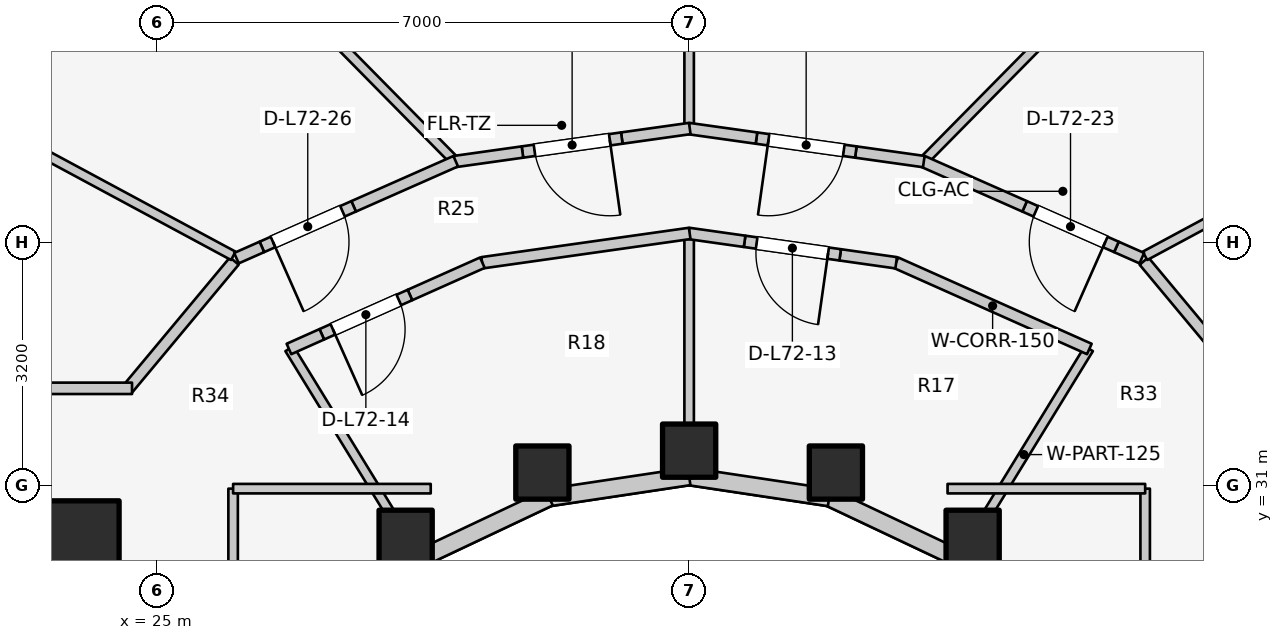
"""IFC4 building model, lengths in metres.
Left out: names, types, materials, properties, quantities, classifications, styles, units other than length and angle.
Written with IfcOpenShell. Run it as: python <this file> out.ifc"""

import sys

from ifc_helpers import new_model, si_unit, direction, frame, frame_2d, origin, origin_2d, place, context, subcontext, project, spatial, rectangle, extrude, element, fill, save


model = new_model("IFC4")
c1 = context("Model", 3, precision=1e-05, world=origin(), true_north=direction((0.0, 1.0)))
c2 = subcontext(c1, "Body", "Model", "MODEL_VIEW")
j1 = project(units=[si_unit("LENGTHUNIT", "METRE"), si_unit("PLANEANGLEUNIT", "RADIAN")], contexts=[c1])
p1 = place(None, origin())
s1 = spatial("IfcSite", under=j1, at=p1, CompositionType="ELEMENT")
p2 = place(p1, origin())
s2 = spatial("IfcBuilding", under=s1, at=p2, CompositionType="ELEMENT")
p3 = place(p2, frame((0.0, 0.0, 235.7)))
s3 = spatial("IfcBuildingStorey", under=s2, at=p3, CompositionType="ELEMENT", Elevation=235.7)
p4 = place(p3, frame((19.65, 30.35, 0.0), z_axis=(0.0, 0.0, 1.0), x_axis=(1.0, 0.0, 0.0)))
e1 = element("IfcWall", 1, at=p4, inside=s3, PredefinedType="SHEAR", context=c2, shape_type="SweptSolid", body=[
    extrude(rectangle(XDim=4.5, YDim=0.55, at=frame_2d((2.25, 0.0))), origin(), (0.0, 0.0, 1.0), 3.1),
])
p5 = place(p3, frame((23.9, 30.2, 0.0), z_axis=(0.0, 0.0, 1.0), x_axis=(1.0, 0.0, 0.0)))
e2 = element("IfcColumn", 2, at=p5, inside=s3, PredefinedType="COLUMN", context=c2, shape_type="SweptSolid", body=[
    extrude(rectangle(XDim=1.2, YDim=1.2, at=origin_2d()), origin(), (0.0, 0.0, 1.0), 3.1),
])
for number, where, z_axis, x_axis in (
    (3, (35.73, 30.327, 0.0), (0.0, 0.0, 1.0), (1.0, 0.0, 0.0)),
    (4, (33.931, 31.172, 0.0), (0.0, 0.0, 1.0), (1.0, 0.0, 0.0)),
    (5, (32.0, 31.46, 0.0), (0.0, 0.0, 1.0), (1.0, 0.0, 0.0)),
    (6, (30.069, 31.172, 0.0), (0.0, 0.0, 1.0), (1.0, 0.0, 0.0)),
    (7, (28.27, 30.327, 0.0), (0.0, 0.0, 1.0), (1.0, 0.0, 0.0)),
):
    element("IfcColumn", number, at=place(p3, frame(where, z_axis=z_axis, x_axis=x_axis)), inside=s3, PredefinedType="COLUMN", context=c2, shape_type="SweptSolid", body=[
        extrude(rectangle(XDim=0.7, YDim=0.7, at=origin_2d()), origin(), (0.0, 0.0, 1.0), 3.1),
    ])
p6 = place(p3, frame((37.035, 28.742, 0.0), z_axis=(0.0, 0.0, 1.0), x_axis=(-0.752576694707, 0.658504607869, 0.0)))
e8 = element("IfcWall", 8, at=p6, inside=s3, PredefinedType="STANDARD", context=c2, shape_type="SweptSolid", body=[
    extrude(rectangle(XDim=1.959, YDim=0.23, at=frame_2d((0.98, 0.0))), origin(), (0.0, 0.0, 1.0), 1.22),
])
p7 = place(p3, frame((35.56, 30.032, 0.0), z_axis=(0.0, 0.0, 1.0), x_axis=(-0.904179699603, 0.427152280606, 0.0)))
e9 = element("IfcWall", 9, at=p7, inside=s3, PredefinedType="STANDARD", context=c2, shape_type="SweptSolid", body=[
    extrude(rectangle(XDim=1.899, YDim=0.23, at=frame_2d((0.95, 0.0))), origin(), (0.0, 0.0, 1.0), 1.22),
])
for number, where, z_axis, x_axis in (
    (10, (33.843, 30.843, 0.0), (0.0, 0.0, 1.0), (-0.989, 0.149, 0.0)),
    (11, (32.0, 31.12, 0.0), (0.0, 0.0, 1.0), (-0.989, -0.149, 0.0)),
):
    element("IfcWall", number, at=place(p3, frame(where, z_axis=z_axis, x_axis=x_axis)), inside=s3, PredefinedType="STANDARD", context=c2, shape_type="SweptSolid", body=[
        extrude(rectangle(XDim=1.864, YDim=0.23, at=frame_2d((0.932, 0.0))), origin(), (0.0, 0.0, 1.0), 1.22),
    ])
p8 = place(p3, frame((30.157, 30.843, 0.0), z_axis=(0.0, 0.0, 1.0), x_axis=(-0.904179699603, -0.427152280606, 0.0)))
e12 = element("IfcWall", 12, at=p8, inside=s3, PredefinedType="STANDARD", context=c2, shape_type="SweptSolid", body=[
    extrude(rectangle(XDim=1.899, YDim=0.23, at=frame_2d((0.95, 0.0))), origin(), (0.0, 0.0, 1.0), 1.22),
])
p9 = place(p3, frame((28.44, 30.032, 0.0), z_axis=(0.0, 0.0, 1.0), x_axis=(-0.752576694707, -0.658504607869, 0.0)))
e13 = element("IfcWall", 13, at=p9, inside=s3, PredefinedType="STANDARD", context=c2, shape_type="SweptSolid", body=[
    extrude(rectangle(XDim=1.959, YDim=0.23, at=frame_2d((0.98, 0.0))), origin(), (0.0, 0.0, 1.0), 1.22),
])
p10 = place(p3, frame((35.55, 30.015, 0.0), z_axis=(0.0, 0.0, 1.0), x_axis=(0.522763432117, 0.852477796802, 0.0)))
e14 = element("IfcWall", 14, at=p10, inside=s3, PredefinedType="PARTITIONING", context=c2, shape_type="SweptSolid", body=[
    extrude(rectangle(XDim=3.269, YDim=0.125, at=frame_2d((1.635, 0.0))), origin(), (0.0, 0.0, 1.0), 1.22),
])
p11 = place(p3, frame((32.0, 31.1, 0.0), z_axis=(0.0, 0.0, 1.0), x_axis=(0.0, 1.0, 0.0)))
e15 = element("IfcWall", 15, at=p11, inside=s3, PredefinedType="PARTITIONING", context=c2, shape_type="SweptSolid", body=[
    extrude(rectangle(XDim=3.218, YDim=0.125, at=frame_2d((1.609, 0.0))), origin(), (0.0, 0.0, 1.0), 1.22),
])
p12 = place(p3, frame((28.45, 30.015, 0.0), z_axis=(0.0, 0.0, 1.0), x_axis=(-0.522763432117, 0.852477796802, 0.0)))
e16 = element("IfcWall", 16, at=p12, inside=s3, PredefinedType="PARTITIONING", context=c2, shape_type="SweptSolid", body=[
    extrude(rectangle(XDim=3.269, YDim=0.125, at=frame_2d((1.635, 0.0))), origin(), (0.0, 0.0, 1.0), 1.22),
])
p13 = place(p3, frame((37.265, 32.798, 0.0), z_axis=(0.0, 0.0, 1.0), x_axis=(-0.913254317828, 0.407389924971, 0.0)))
e17 = element("IfcWall", 17, at=p13, inside=s3, PredefinedType="PARTITIONING", context=c2, shape_type="SweptSolid", body=[
    extrude(rectangle(XDim=2.787, YDim=0.15, at=frame_2d((1.393, 0.0))), origin(), (0.0, 0.0, 1.0), 1.22),
])
p14 = place(p3, frame((34.724, 33.932, 0.0), z_axis=(0.0, 0.0, 1.0), x_axis=(-0.990190745647, 0.13972217875, 0.0)))
e18 = element("IfcWall", 18, at=p14, inside=s3, PredefinedType="PARTITIONING", context=c2, shape_type="SweptSolid", body=[
    extrude(rectangle(XDim=0.744, YDim=0.15, at=frame_2d((0.372, 0.0))), origin(), (0.0, 0.0, 1.0), 2.575),
])
p15 = place(p3, frame((33.987, 34.036, 0.0), z_axis=(0.0, 0.0, 1.0), x_axis=(-0.990133183593, 0.140129507055, 0.0)))
e19 = element("IfcWall", 19, at=p15, inside=s3, PredefinedType="PARTITIONING", context=c2, shape_type="SweptSolid", body=[
    extrude(rectangle(XDim=1.27, YDim=0.15, at=frame_2d((0.635, 0.0))), origin(), (0.0, 0.0, 1.0), 2.575),
])
p16 = place(p15, frame((0.16, 0.0, 0.0)))
e20 = element("IfcOpeningElement", 20, at=p16, cuts=e19, PredefinedType="OPENING", context=c2, shape_type="SweptSolid", body=[
    extrude(rectangle(XDim=0.95, YDim=2.1, at=frame_2d((0.475, 1.05))), frame((0.0, 0.085, 0.0), z_axis=(0.0, -1.0, 0.0), x_axis=(1.0, 0.0, 0.0)), (0.0, 0.0, 1.0), 0.17),
])
p17 = place(p3, frame((32.729, 34.214, 0.0), z_axis=(0.0, 0.0, 1.0), x_axis=(-0.990138882688, 0.140089232242, 0.0)))
e21 = element("IfcWall", 21, at=p17, inside=s3, PredefinedType="PARTITIONING", context=c2, shape_type="SweptSolid", body=[
    extrude(rectangle(XDim=0.744, YDim=0.15, at=frame_2d((0.372, 0.0))), origin(), (0.0, 0.0, 1.0), 1.22),
])
p18 = place(p3, frame((32.007, 34.318, 0.0), z_axis=(0.0, 0.0, 1.0), x_axis=(-0.990150268487, -0.140008734782, 0.0)))
e22 = element("IfcWall", 22, at=p18, inside=s3, PredefinedType="PARTITIONING", context=c2, shape_type="SweptSolid", body=[
    extrude(rectangle(XDim=2.759, YDim=0.15, at=frame_2d((1.379, 0.0))), origin(), (0.0, 0.0, 1.0), 1.22),
])
p19 = place(p3, frame((29.28, 33.933, 0.0), z_axis=(0.0, 0.0, 1.0), x_axis=(-0.913260714955, -0.407375584099, 0.0)))
e23 = element("IfcWall", 23, at=p19, inside=s3, PredefinedType="PARTITIONING", context=c2, shape_type="SweptSolid", body=[
    extrude(rectangle(XDim=1.043, YDim=0.15, at=frame_2d((0.522, 0.0))), origin(), (0.0, 0.0, 1.0), 1.22),
])
p20 = place(p3, frame((28.327, 33.508, 0.0), z_axis=(0.0, 0.0, 1.0), x_axis=(-0.913279660534, -0.40733310896, 0.0)))
e24 = element("IfcWall", 24, at=p20, inside=s3, PredefinedType="PARTITIONING", context=c2, shape_type="SweptSolid", body=[
    extrude(rectangle(XDim=1.27, YDim=0.15, at=frame_2d((0.635, 0.0))), origin(), (0.0, 0.0, 1.0), 2.16),
])
p21 = place(p20, frame((0.16, 0.0, 0.0)))
e25 = element("IfcOpeningElement", 25, at=p21, cuts=e24, PredefinedType="OPENING", context=c2, shape_type="SweptSolid", body=[
    extrude(rectangle(XDim=0.95, YDim=2.1, at=frame_2d((0.475, 1.05))), frame((0.0, 0.085, 0.0), z_axis=(0.0, -1.0, 0.0), x_axis=(1.0, 0.0, 0.0)), (0.0, 0.0, 1.0), 0.17),
])
p22 = place(p3, frame((27.167, 32.99, 0.0), z_axis=(0.0, 0.0, 1.0), x_axis=(-0.913172173043, -0.407574020737, 0.0)))
e26 = element("IfcWall", 26, at=p22, inside=s3, PredefinedType="PARTITIONING", context=c2, shape_type="SweptSolid", body=[
    extrude(rectangle(XDim=0.473, YDim=0.15, at=frame_2d((0.237, 0.0))), origin(), (0.0, 0.0, 1.0), 2.575),
])
p23 = place(p3, frame((26.0, 25.8, 0.0), z_axis=(0.0, 0.0, 1.0), x_axis=(0.0, 1.0, 0.0)))
e27 = element("IfcWall", 27, at=p23, inside=s3, PredefinedType="PARTITIONING", context=c2, shape_type="SweptSolid", body=[
    extrude(rectangle(XDim=5.16, YDim=0.125, at=frame_2d((2.58, 0.0))), origin(), (0.0, 0.0, 1.0), 1.952),
])
p24 = place(p3, frame((26.0, 30.96, 0.0), z_axis=(0.0, 0.0, 1.0), x_axis=(1.0, 0.0, 0.0)))
e28 = element("IfcWall", 28, at=p24, inside=s3, PredefinedType="PARTITIONING", context=c2, shape_type="SweptSolid", body=[
    extrude(rectangle(XDim=2.6, YDim=0.125, at=frame_2d((1.3, 0.0))), origin(), (0.0, 0.0, 1.0), 1.22),
])
p25 = place(p3, frame((38.0, 25.8, 0.0), z_axis=(0.0, 0.0, 1.0), x_axis=(0.0, 1.0, 0.0)))
e29 = element("IfcWall", 29, at=p25, inside=s3, PredefinedType="PARTITIONING", context=c2, shape_type="SweptSolid", body=[
    extrude(rectangle(XDim=5.16, YDim=0.125, at=frame_2d((2.58, 0.0))), origin(), (0.0, 0.0, 1.0), 1.952),
])
p26 = place(p3, frame((35.4, 30.96, 0.0), z_axis=(0.0, 0.0, 1.0), x_axis=(1.0, 0.0, 0.0)))
e30 = element("IfcWall", 30, at=p26, inside=s3, PredefinedType="PARTITIONING", context=c2, shape_type="SweptSolid", body=[
    extrude(rectangle(XDim=2.6, YDim=0.125, at=frame_2d((1.3, 0.0))), origin(), (0.0, 0.0, 1.0), 1.22),
])
for number, where, z_axis, x_axis in (
    (31, (37.984, 33.955, 0.0), (0.0, 0.0, 1.0), (0.64, -0.768, 0.0)),
    (32, (26.016, 33.955, 0.0), (0.0, 0.0, 1.0), (-0.64, -0.768, 0.0)),
):
    element("IfcWall", number, at=place(p3, frame(where, z_axis=z_axis, x_axis=x_axis)), inside=s3, PredefinedType="PARTITIONING", context=c2, shape_type="SweptSolid", body=[
        extrude(rectangle(XDim=2.21, YDim=0.15, at=frame_2d((1.105, 0.0))), origin(), (0.0, 0.0, 1.0), 1.22),
    ])
p27 = place(p3, frame((19.51, 32.28, 0.0), z_axis=(0.0, 0.0, 1.0), x_axis=(1.0, 0.0, 0.0)))
e33 = element("IfcWall", 33, at=p27, inside=s3, PredefinedType="PARTITIONING", context=c2, shape_type="SweptSolid", body=[
    extrude(rectangle(XDim=5.16, YDim=0.15, at=frame_2d((2.58, 0.0))), origin(), (0.0, 0.0, 1.0), 1.22),
])
p28 = place(p3, frame((37.997, 34.023, 0.0), z_axis=(0.0, 0.0, 1.0), x_axis=(0.880531534665, 0.473987569943, 0.0)))
e34 = element("IfcWall", 34, at=p28, inside=s3, PredefinedType="PARTITIONING", context=c2, shape_type="SweptSolid", body=[
    extrude(rectangle(XDim=6.096, YDim=0.125, at=frame_2d((3.048, 0.0))), origin(), (0.0, 0.0, 1.0), 1.22),
])
p29 = place(p3, frame((35.118, 35.304, 0.0), z_axis=(0.0, 0.0, 1.0), x_axis=(0.702191571271, 0.711988059756, 0.0)))
e35 = element("IfcWall", 35, at=p29, inside=s3, PredefinedType="PARTITIONING", context=c2, shape_type="SweptSolid", body=[
    extrude(rectangle(XDim=5.184, YDim=0.125, at=frame_2d((2.592, 0.0))), origin(), (0.0, 0.0, 1.0), 1.22),
])
p30 = place(p3, frame((32.0, 35.753, 0.0), z_axis=(0.0, 0.0, 1.0), x_axis=(0.0, 1.0, 0.0)))
e36 = element("IfcWall", 36, at=p30, inside=s3, PredefinedType="PARTITIONING", context=c2, shape_type="SweptSolid", body=[
    extrude(rectangle(XDim=3.947, YDim=0.125, at=frame_2d((1.974, 0.0))), origin(), (0.0, 0.0, 1.0), 1.22),
])
p31 = place(p3, frame((28.882, 35.304, 0.0), z_axis=(0.0, 0.0, 1.0), x_axis=(-0.702191571271, 0.711988059756, 0.0)))
e37 = element("IfcWall", 37, at=p31, inside=s3, PredefinedType="PARTITIONING", context=c2, shape_type="SweptSolid", body=[
    extrude(rectangle(XDim=5.184, YDim=0.125, at=frame_2d((2.592, 0.0))), origin(), (0.0, 0.0, 1.0), 1.22),
])
p32 = place(p3, frame((26.003, 34.023, 0.0), z_axis=(0.0, 0.0, 1.0), x_axis=(-0.880531534665, 0.473987569943, 0.0)))
e38 = element("IfcWall", 38, at=p32, inside=s3, PredefinedType="PARTITIONING", context=c2, shape_type="SweptSolid", body=[
    extrude(rectangle(XDim=6.096, YDim=0.125, at=frame_2d((3.048, 0.0))), origin(), (0.0, 0.0, 1.0), 1.22),
])
p33 = place(p3, frame((37.956, 33.992, 0.0), z_axis=(0.0, 0.0, 1.0), x_axis=(-0.91474391497, 0.404034119877, 0.0)))
e39 = element("IfcWall", 39, at=p33, inside=s3, PredefinedType="PARTITIONING", context=c2, shape_type="SweptSolid", body=[
    extrude(rectangle(XDim=0.366, YDim=0.15, at=frame_2d((0.183, 0.0))), origin(), (0.0, 0.0, 1.0), 2.575),
])
p34 = place(p3, frame((37.621, 34.14, 0.0), z_axis=(0.0, 0.0, 1.0), x_axis=(-0.914618215061, 0.404318588094, 0.0)))
e40 = element("IfcWall", 40, at=p34, inside=s3, PredefinedType="PARTITIONING", context=c2, shape_type="SweptSolid", body=[
    extrude(rectangle(XDim=1.32, YDim=0.15, at=frame_2d((0.66, 0.0))), origin(), (0.0, 0.0, 1.0), 2.16),
])
p35 = place(p34, frame((0.16, 0.0, 0.0)))
e41 = element("IfcOpeningElement", 41, at=p35, cuts=e40, PredefinedType="OPENING", context=c2, shape_type="SweptSolid", body=[
    extrude(rectangle(XDim=1.0, YDim=2.1, at=frame_2d((0.5, 1.05))), frame((0.0, 0.085, 0.0), z_axis=(0.0, -1.0, 0.0), x_axis=(1.0, 0.0, 0.0)), (0.0, 0.0, 1.0), 0.17),
])
p36 = place(p3, frame((36.414, 34.674, 0.0), z_axis=(0.0, 0.0, 1.0), x_axis=(-0.914639417368, 0.404270622476, 0.0)))
e42 = element("IfcWall", 42, at=p36, inside=s3, PredefinedType="PARTITIONING", context=c2, shape_type="SweptSolid", body=[
    extrude(rectangle(XDim=1.468, YDim=0.15, at=frame_2d((0.734, 0.0))), origin(), (0.0, 0.0, 1.0), 1.22),
])
p37 = place(p3, frame((35.087, 35.263, 0.0), z_axis=(0.0, 0.0, 1.0), x_axis=(-0.990260655864, 0.139225836137, 0.0)))
e43 = element("IfcWall", 43, at=p37, inside=s3, PredefinedType="PARTITIONING", context=c2, shape_type="SweptSolid", body=[
    extrude(rectangle(XDim=0.903, YDim=0.15, at=frame_2d((0.452, 0.0))), origin(), (0.0, 0.0, 1.0), 2.105),
])
p38 = place(p3, frame((34.193, 35.389, 0.0), z_axis=(0.0, 0.0, 1.0), x_axis=(-0.990279679751, 0.139090459315, 0.0)))
e44 = element("IfcWall", 44, at=p38, inside=s3, PredefinedType="PARTITIONING", context=c2, shape_type="SweptSolid", body=[
    extrude(rectangle(XDim=1.32, YDim=0.15, at=frame_2d((0.66, 0.0))), origin(), (0.0, 0.0, 1.0), 2.16),
])
p39 = place(p38, frame((0.16, 0.0, 0.0)))
e45 = element("IfcOpeningElement", 45, at=p39, cuts=e44, PredefinedType="OPENING", context=c2, shape_type="SweptSolid", body=[
    extrude(rectangle(XDim=1.0, YDim=2.1, at=frame_2d((0.5, 1.05))), frame((0.0, 0.085, 0.0), z_axis=(0.0, -1.0, 0.0), x_axis=(1.0, 0.0, 0.0)), (0.0, 0.0, 1.0), 0.17),
])
for number, where, z_axis, x_axis in (
    (46, (32.886, 35.572, 0.0), (0.0, 0.0, 1.0), (-0.99, 0.139, 0.0)),
    (47, (32.008, 35.698, 0.0), (0.0, 0.0, 1.0), (-0.99, -0.139, 0.0)),
):
    element("IfcWall", number, at=place(p3, frame(where, z_axis=z_axis, x_axis=x_axis)), inside=s3, PredefinedType="PARTITIONING", context=c2, shape_type="SweptSolid", body=[
        extrude(rectangle(XDim=0.903, YDim=0.15, at=frame_2d((0.452, 0.0))), origin(), (0.0, 0.0, 1.0), 1.22),
    ])
p40 = place(p3, frame((31.114, 35.572, 0.0), z_axis=(0.0, 0.0, 1.0), x_axis=(-0.990279679751, -0.139090459315, 0.0)))
e48 = element("IfcWall", 48, at=p40, inside=s3, PredefinedType="PARTITIONING", context=c2, shape_type="SweptSolid", body=[
    extrude(rectangle(XDim=1.32, YDim=0.15, at=frame_2d((0.66, 0.0))), origin(), (0.0, 0.0, 1.0), 2.16),
])
p41 = place(p40, frame((0.16, 0.0, 0.0)))
e49 = element("IfcOpeningElement", 49, at=p41, cuts=e48, PredefinedType="OPENING", context=c2, shape_type="SweptSolid", body=[
    extrude(rectangle(XDim=1.0, YDim=2.1, at=frame_2d((0.5, 1.05))), frame((0.0, 0.085, 0.0), z_axis=(0.0, -1.0, 0.0), x_axis=(1.0, 0.0, 0.0)), (0.0, 0.0, 1.0), 0.17),
])
p42 = place(p3, frame((29.807, 35.389, 0.0), z_axis=(0.0, 0.0, 1.0), x_axis=(-0.990260655864, -0.139225836137, 0.0)))
e50 = element("IfcWall", 50, at=p42, inside=s3, PredefinedType="PARTITIONING", context=c2, shape_type="SweptSolid", body=[
    extrude(rectangle(XDim=0.903, YDim=0.15, at=frame_2d((0.452, 0.0))), origin(), (0.0, 0.0, 1.0), 2.105),
])
p43 = place(p3, frame((28.929, 35.268, 0.0), z_axis=(0.0, 0.0, 1.0), x_axis=(-0.91466659005, -0.404209140231, 0.0)))
e51 = element("IfcWall", 51, at=p43, inside=s3, PredefinedType="PARTITIONING", context=c2, shape_type="SweptSolid", body=[
    extrude(rectangle(XDim=1.468, YDim=0.15, at=frame_2d((0.734, 0.0))), origin(), (0.0, 0.0, 1.0), 1.22),
])
p44 = place(p3, frame((27.586, 34.674, 0.0), z_axis=(0.0, 0.0, 1.0), x_axis=(-0.914618215061, -0.404318588094, 0.0)))
e52 = element("IfcWall", 52, at=p44, inside=s3, PredefinedType="PARTITIONING", context=c2, shape_type="SweptSolid", body=[
    extrude(rectangle(XDim=1.32, YDim=0.15, at=frame_2d((0.66, 0.0))), origin(), (0.0, 0.0, 1.0), 2.16),
])
p45 = place(p44, frame((0.16, 0.0, 0.0)))
e53 = element("IfcOpeningElement", 53, at=p45, cuts=e52, PredefinedType="OPENING", context=c2, shape_type="SweptSolid", body=[
    extrude(rectangle(XDim=1.0, YDim=2.1, at=frame_2d((0.5, 1.05))), frame((0.0, 0.085, 0.0), z_axis=(0.0, -1.0, 0.0), x_axis=(1.0, 0.0, 0.0)), (0.0, 0.0, 1.0), 0.17),
])
p46 = place(p3, frame((26.378, 34.14, 0.0), z_axis=(0.0, 0.0, 1.0), x_axis=(-0.914634977088, -0.404280668209, 0.0)))
e54 = element("IfcWall", 54, at=p46, inside=s3, PredefinedType="PARTITIONING", context=c2, shape_type="SweptSolid", body=[
    extrude(rectangle(XDim=0.366, YDim=0.15, at=frame_2d((0.183, 0.0))), origin(), (0.0, 0.0, 1.0), 2.575),
])
p47 = place(p16, origin())
e55 = element("IfcDoor", 55, at=p47, inside=s3, OperationType="SINGLE_SWING_LEFT", PredefinedType="DOOR", context=c2, shape_type="SweptSolid", body=[
    extrude(rectangle(XDim=0.95, YDim=2.1, at=frame_2d((0.475, 1.05))), frame((0.0, 0.025, 0.0), z_axis=(0.0, -1.0, 0.0), x_axis=(1.0, 0.0, 0.0)), (0.0, 0.0, 1.0), 0.05),
])
fill(e20, e55)
p48 = place(p21, origin())
e56 = element("IfcDoor", 56, at=p48, inside=s3, OperationType="SINGLE_SWING_RIGHT", PredefinedType="DOOR", context=c2, shape_type="SweptSolid", body=[
    extrude(rectangle(XDim=0.95, YDim=2.1, at=frame_2d((0.475, 1.05))), frame((0.0, 0.025, 0.0), z_axis=(0.0, -1.0, 0.0), x_axis=(1.0, 0.0, 0.0)), (0.0, 0.0, 1.0), 0.05),
])
fill(e25, e56)
p49 = place(p35, origin())
e57 = element("IfcDoor", 57, at=p49, inside=s3, OperationType="SINGLE_SWING_LEFT", PredefinedType="DOOR", context=c2, shape_type="SweptSolid", body=[
    extrude(rectangle(XDim=1.0, YDim=2.1, at=frame_2d((0.5, 1.05))), frame((0.0, 0.025, 0.0), z_axis=(0.0, -1.0, 0.0), x_axis=(1.0, 0.0, 0.0)), (0.0, 0.0, 1.0), 0.05),
])
fill(e41, e57)
p50 = place(p39, origin())
e58 = element("IfcDoor", 58, at=p50, inside=s3, OperationType="SINGLE_SWING_RIGHT", PredefinedType="DOOR", context=c2, shape_type="SweptSolid", body=[
    extrude(rectangle(XDim=1.0, YDim=2.1, at=frame_2d((0.5, 1.05))), frame((0.0, 0.025, 0.0), z_axis=(0.0, -1.0, 0.0), x_axis=(1.0, 0.0, 0.0)), (0.0, 0.0, 1.0), 0.05),
])
fill(e45, e58)
p51 = place(p41, origin())
e59 = element("IfcDoor", 59, at=p51, inside=s3, OperationType="SINGLE_SWING_LEFT", PredefinedType="DOOR", context=c2, shape_type="SweptSolid", body=[
    extrude(rectangle(XDim=1.0, YDim=2.1, at=frame_2d((0.5, 1.05))), frame((0.0, 0.025, 0.0), z_axis=(0.0, -1.0, 0.0), x_axis=(1.0, 0.0, 0.0)), (0.0, 0.0, 1.0), 0.05),
])
fill(e49, e59)
p52 = place(p45, origin())
e60 = element("IfcDoor", 60, at=p52, inside=s3, OperationType="SINGLE_SWING_RIGHT", PredefinedType="DOOR", context=c2, shape_type="SweptSolid", body=[
    extrude(rectangle(XDim=1.0, YDim=2.1, at=frame_2d((0.5, 1.05))), frame((0.0, 0.025, 0.0), z_axis=(0.0, -1.0, 0.0), x_axis=(1.0, 0.0, 0.0)), (0.0, 0.0, 1.0), 0.05),
])
fill(e53, e60)
save(model, sys.argv[1])
